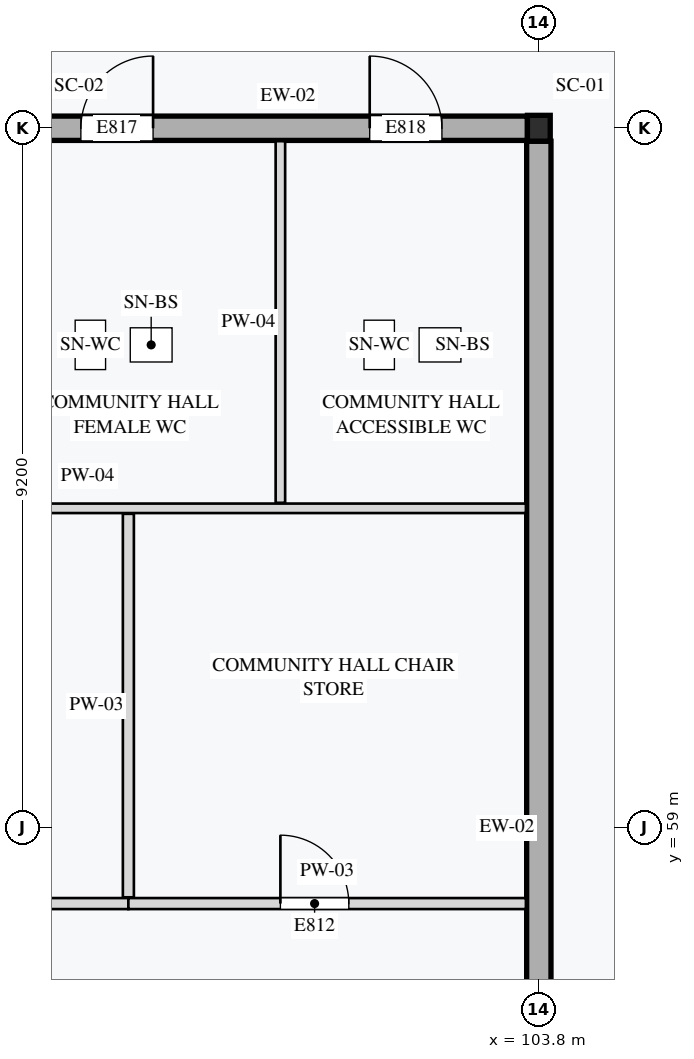
"""IFC4 building model, lengths in metres.
Left out: names, types, materials, properties, quantities, classifications, styles, units other than length and angle.
Written with IfcOpenShell. Run it as: python <this file> out.ifc"""

import sys

from ifc_helpers import new_model, si_unit, direction, frame, frame_2d, origin, origin_2d, place, context, subcontext, project, spatial, rectangle, i_section, extrude, element, fill, save


model = new_model("IFC4")
c1 = context("Model", 3, precision=1e-05, world=origin(), true_north=direction((0.0, 1.0)))
c2 = subcontext(c1, "Body", "Model", "MODEL_VIEW")
j1 = project(units=[si_unit("LENGTHUNIT", "METRE"), si_unit("PLANEANGLEUNIT", "RADIAN")], contexts=[c1])
p1 = place(None, origin())
s1 = spatial("IfcSite", under=j1, at=p1, CompositionType="ELEMENT")
p2 = place(p1, origin())
s2 = spatial("IfcBuilding", under=s1, at=p2, CompositionType="ELEMENT")
p3 = place(p2, frame((0.0, 0.0, 4.2)))
s3 = spatial("IfcBuildingStorey", under=s2, at=p3, CompositionType="ELEMENT", Elevation=4.2)
p4 = place(p3, frame((103.8, 68.2, 0.0), z_axis=(0.0, 0.0, 1.0), x_axis=(1.0, 0.0, 0.0)))
e1 = element("IfcColumn", 1, at=p4, inside=s3, PredefinedType="COLUMN", context=c2, shape_type="SweptSolid", body=[
    extrude(i_section(OverallWidth=0.3, OverallDepth=0.34, WebThickness=0.012, FlangeThickness=0.021, FilletRadius=0.027, at=origin_2d()), origin(), (0.0, 0.0, 1.0), 3.96),
])
p5 = place(p3, frame((97.35, 68.2, 0.0), z_axis=(0.0, 0.0, 1.0), x_axis=(1.0, 0.0, 0.0)))
e2 = element("IfcWall", 2, at=p5, inside=s3, PredefinedType="STANDARD", context=c2, shape_type="SweptSolid", body=[
    extrude(rectangle(XDim=6.3, YDim=0.32, at=frame_2d((3.15, 0.0))), origin(), (0.0, 0.0, 1.0), 3.55),
])
p6 = place(p5, frame((0.425, 0.0, 0.0)))
e3 = element("IfcOpeningElement", 3, at=p6, cuts=e2, PredefinedType="OPENING", context=c2, shape_type="SweptSolid", body=[
    extrude(rectangle(XDim=0.95, YDim=2.3, at=frame_2d((0.475, 1.15))), frame((0.0, 0.17, 0.0), z_axis=(0.0, -1.0, 0.0), x_axis=(1.0, 0.0, 0.0)), (0.0, 0.0, 1.0), 0.34),
])
p7 = place(p5, frame((4.225, 0.0, 0.0)))
e4 = element("IfcOpeningElement", 4, at=p7, cuts=e2, PredefinedType="OPENING", context=c2, shape_type="SweptSolid", body=[
    extrude(rectangle(XDim=0.95, YDim=2.3, at=frame_2d((0.475, 1.15))), frame((0.0, 0.17, 0.0), z_axis=(0.0, -1.0, 0.0), x_axis=(1.0, 0.0, 0.0)), (0.0, 0.0, 1.0), 0.34),
])
p8 = place(p3, frame((103.8, 49.97, 0.0), z_axis=(0.0, 0.0, 1.0), x_axis=(0.0, 1.0, 0.0)))
e5 = element("IfcWall", 5, at=p8, inside=s3, PredefinedType="STANDARD", context=c2, shape_type="SweptSolid", body=[
    extrude(rectangle(XDim=18.06, YDim=0.32, at=frame_2d((9.03, 0.0))), origin(), (0.0, 0.0, 1.0), 2.6),
])
p9 = place(p3, frame((92.1, 58.0, 0.0), z_axis=(0.0, 0.0, 1.0), x_axis=(1.0, 0.0, 0.0)))
e6 = element("IfcWall", 6, at=p9, inside=s3, PredefinedType="PARTITIONING", context=c2, shape_type="SweptSolid", body=[
    extrude(rectangle(XDim=6.3, YDim=0.145, at=frame_2d((3.15, 0.0))), origin(), (0.0, 0.0, 1.0), 2.6),
])
p10 = place(p9, frame((2.3, 0.0, 0.0)))
e7 = element("IfcOpeningElement", 7, at=p10, cuts=e6, PredefinedType="OPENING", context=c2, shape_type="SweptSolid", body=[
    extrude(rectangle(XDim=0.9, YDim=2.1, at=frame_2d((0.45, 1.05))), frame((0.0, 0.083, 0.0), z_axis=(0.0, -1.0, 0.0), x_axis=(1.0, 0.0, 0.0)), (0.0, 0.0, 1.0), 0.165),
])
p11 = place(p3, frame((98.4, 58.0, 0.0), z_axis=(0.0, 0.0, 1.0), x_axis=(1.0, 0.0, 0.0)))
e8 = element("IfcWall", 8, at=p11, inside=s3, PredefinedType="PARTITIONING", context=c2, shape_type="SweptSolid", body=[
    extrude(rectangle(XDim=5.23, YDim=0.145, at=frame_2d((2.615, 0.0))), origin(), (0.0, 0.0, 1.0), 2.6),
])
p12 = place(p11, frame((2.0, 0.0, 0.0)))
e9 = element("IfcOpeningElement", 9, at=p12, cuts=e8, PredefinedType="OPENING", context=c2, shape_type="SweptSolid", body=[
    extrude(rectangle(XDim=0.9, YDim=2.16, at=frame_2d((0.45, 1.08))), frame((0.0, 0.083, 0.0), z_axis=(0.0, -1.0, 0.0), x_axis=(1.0, 0.0, 0.0)), (0.0, 0.0, 1.0), 0.165),
])
p13 = place(p3, frame((92.097, 63.2, 0.0), z_axis=(0.0, 0.0, 1.0), x_axis=(1.0, 0.0, 0.0)))
e10 = element("IfcWall", 10, at=p13, inside=s3, PredefinedType="PARTITIONING", context=c2, shape_type="SweptSolid", body=[
    extrude(rectangle(XDim=11.532, YDim=0.125, at=frame_2d((5.766, 0.0))), origin(), (0.0, 0.0, 1.0), 2.6),
])
p14 = place(p3, frame((98.4, 58.083, 0.0), z_axis=(0.0, 0.0, 1.0), x_axis=(0.0, 1.0, 0.0)))
e11 = element("IfcWall", 11, at=p14, inside=s3, PredefinedType="PARTITIONING", context=c2, shape_type="SweptSolid", body=[
    extrude(rectangle(XDim=5.045, YDim=0.145, at=frame_2d((2.522, 0.0))), origin(), (0.0, 0.0, 1.0), 2.6),
])
p15 = place(p3, frame((100.4, 63.272, 0.0), z_axis=(0.0, 0.0, 1.0), x_axis=(0.0, 1.0, 0.0)))
e12 = element("IfcWall", 12, at=p15, inside=s3, PredefinedType="PARTITIONING", context=c2, shape_type="SweptSolid", body=[
    extrude(rectangle(XDim=4.758, YDim=0.125, at=frame_2d((2.379, 0.0))), origin(), (0.0, 0.0, 1.0), 2.6),
])
p16 = place(p6, origin())
e13 = element("IfcDoor", 13, at=p16, inside=s3, OperationType="SINGLE_SWING_RIGHT", PredefinedType="DOOR", context=c2, shape_type="SweptSolid", body=[
    extrude(rectangle(XDim=0.95, YDim=2.3, at=frame_2d((0.475, 1.15))), frame((0.0, 0.025, 0.0), z_axis=(0.0, -1.0, 0.0), x_axis=(1.0, 0.0, 0.0)), (0.0, 0.0, 1.0), 0.05),
])
fill(e3, e13)
p17 = place(p7, origin())
e14 = element("IfcDoor", 14, at=p17, inside=s3, OperationType="SINGLE_SWING_LEFT", PredefinedType="DOOR", context=c2, shape_type="SweptSolid", body=[
    extrude(rectangle(XDim=0.95, YDim=2.3, at=frame_2d((0.475, 1.15))), frame((0.0, 0.025, 0.0), z_axis=(0.0, -1.0, 0.0), x_axis=(1.0, 0.0, 0.0)), (0.0, 0.0, 1.0), 0.05),
])
fill(e4, e14)
p18 = place(p12, origin())
e15 = element("IfcDoor", 15, at=p18, inside=s3, OperationType="SINGLE_SWING_LEFT", PredefinedType="DOOR", context=c2, shape_type="SweptSolid", body=[
    extrude(rectangle(XDim=0.9, YDim=2.16, at=frame_2d((0.45, 1.08))), frame((0.0, 0.025, 0.0), z_axis=(0.0, -1.0, 0.0), x_axis=(1.0, 0.0, 0.0)), (0.0, 0.0, 1.0), 0.05),
])
fill(e9, e15)
save(model, sys.argv[1])
